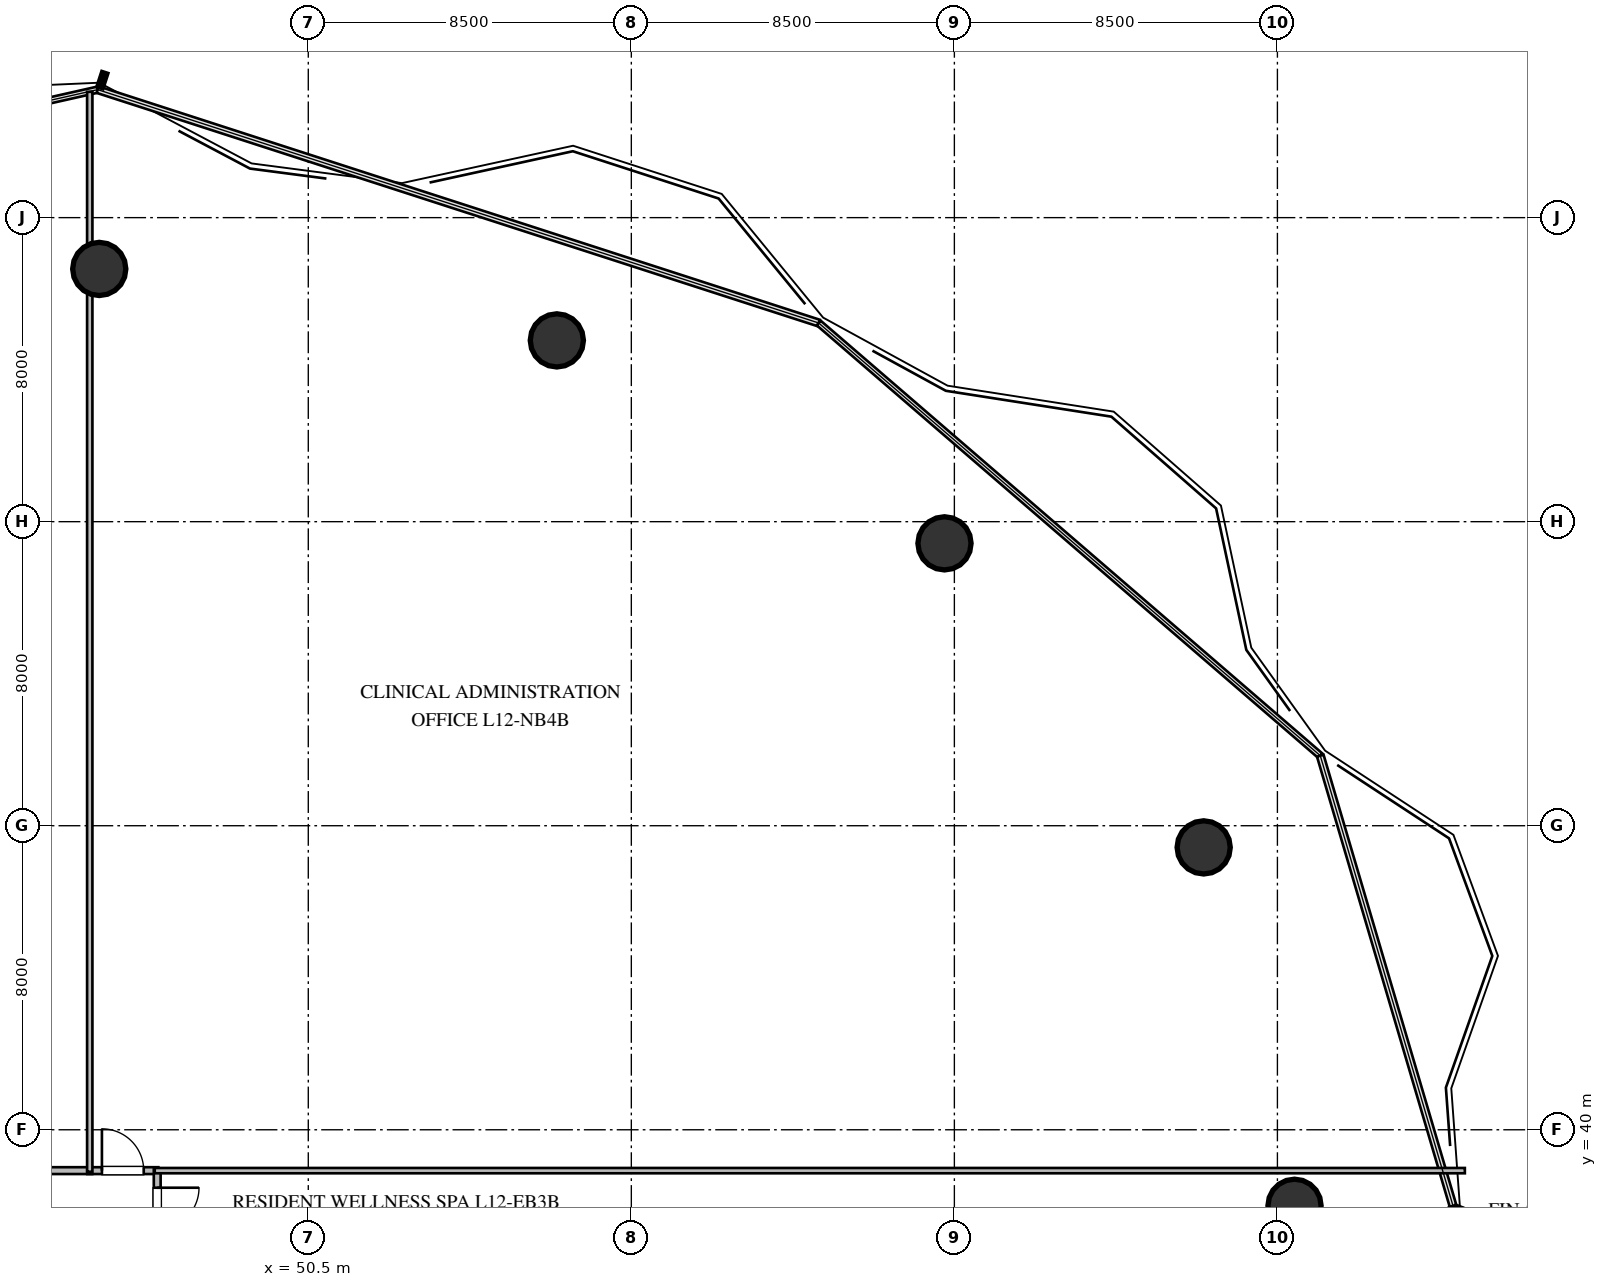
"""IFC4 building model, lengths in metres.
Left out: names, types, materials, properties, quantities, classifications, styles, units other than length and angle.
Written with IfcOpenShell. Run it as: python <this file> out.ifc"""

import sys

from ifc_helpers import new_model, si_unit, direction, frame, frame_2d, origin, origin_2d, place, context, subcontext, project, spatial, rectangle, circle, extrude, element, fill, save


model = new_model("IFC4")
c1 = context("Model", 3, precision=1e-05, world=origin(), true_north=direction((0.0, 1.0)))
c2 = subcontext(c1, "Body", "Model", "MODEL_VIEW")
j1 = project(units=[si_unit("LENGTHUNIT", "METRE"), si_unit("PLANEANGLEUNIT", "RADIAN")], contexts=[c1])
p1 = place(None, origin())
s1 = spatial("IfcSite", under=j1, at=p1, CompositionType="ELEMENT")
p2 = place(p1, origin())
s2 = spatial("IfcBuilding", under=s1, at=p2, CompositionType="ELEMENT")
p3 = place(p2, frame((0.0, 0.0, 49.2)))
s3 = spatial("IfcBuildingStorey", under=s2, at=p3, CompositionType="ELEMENT", Elevation=49.2)
for number, where, z_axis, x_axis in (
    (1, (76.45, 38.0, 0.0), (0.0, 0.0, 1.0), (1.0, 0.0, 0.0)),
    (2, (74.06, 47.43, 0.0), (0.0, 0.0, 1.0), (1.0, 0.0, 0.0)),
    (3, (67.24, 55.43, 0.0), (0.0, 0.0, 1.0), (1.0, 0.0, 0.0)),
    (4, (57.04, 60.77, 0.0), (0.0, 0.0, 1.0), (1.0, 0.0, 0.0)),
    (5, (45.0, 62.65, 0.0), (0.0, 0.0, 1.0), (1.0, 0.0, 0.0)),
):
    element("IfcColumn", number, at=place(p3, frame(where, z_axis=z_axis, x_axis=x_axis)), inside=s3, PredefinedType="COLUMN", context=c2, shape_type="SweptSolid", body=[
        extrude(circle(Radius=0.7, at=origin_2d()), origin(), (0.0, 0.0, 1.0), 3.6),
    ])
p4 = place(p3, frame((39.935, 38.925, 0.0), z_axis=(0.0, 0.0, 1.0), x_axis=(1.0, 0.0, 0.0)))
e6 = element("IfcWall", 6, at=p4, inside=s3, PredefinedType="PARTITIONING", context=c2, shape_type="SweptSolid", body=[
    extrude(rectangle(XDim=4.88, YDim=0.18, at=frame_2d((2.44, 0.0))), origin(), (0.0, 0.0, 1.0), 3.36),
])
p5 = place(p4, frame((1.89, 0.0, 0.0)))
e7 = element("IfcOpeningElement", 7, at=p5, cuts=e6, PredefinedType="OPENING", context=c2, shape_type="SweptSolid", body=[
    extrude(rectangle(XDim=1.1, YDim=2.1, at=frame_2d((0.55, 1.05))), frame((0.0, 0.1, 0.0), z_axis=(0.0, -1.0, 0.0), x_axis=(1.0, 0.0, 0.0)), (0.0, 0.0, 1.0), 0.2),
])
p6 = place(p3, frame((44.685, 38.925, 0.0), z_axis=(0.0, 0.0, 1.0), x_axis=(1.0, 0.0, 0.0)))
e8 = element("IfcWall", 8, at=p6, inside=s3, PredefinedType="PARTITIONING", context=c2, shape_type="SweptSolid", body=[
    extrude(rectangle(XDim=1.87, YDim=0.18, at=frame_2d((0.935, 0.0))), origin(), (0.0, 0.0, 1.0), 3.36),
])
p7 = place(p6, frame((0.385, 0.0, 0.0)))
e9 = element("IfcOpeningElement", 9, at=p7, cuts=e8, PredefinedType="OPENING", context=c2, shape_type="SweptSolid", body=[
    extrude(rectangle(XDim=1.1, YDim=2.1, at=frame_2d((0.55, 1.05))), frame((0.0, 0.1, 0.0), z_axis=(0.0, -1.0, 0.0), x_axis=(1.0, 0.0, 0.0)), (0.0, 0.0, 1.0), 0.2),
])
p8 = place(p3, frame((46.525, 38.955, 0.0), z_axis=(0.0, 0.0, 1.0), x_axis=(0.0, -1.0, 0.0)))
e10 = element("IfcWall", 10, at=p8, inside=s3, PredefinedType="PARTITIONING", context=c2, shape_type="SweptSolid", body=[
    extrude(rectangle(XDim=2.06, YDim=0.18, at=frame_2d((1.03, 0.0))), origin(), (0.0, 0.0, 1.0), 3.36),
])
p9 = place(p8, frame((0.48, 0.0, 0.0)))
e11 = element("IfcOpeningElement", 11, at=p9, cuts=e10, PredefinedType="OPENING", context=c2, shape_type="SweptSolid", body=[
    extrude(rectangle(XDim=1.1, YDim=2.1, at=frame_2d((0.55, 1.05))), frame((0.0, 0.1, 0.0), z_axis=(0.0, -1.0, 0.0), x_axis=(1.0, 0.0, 0.0)), (0.0, 0.0, 1.0), 0.2),
])
p10 = place(p3, frame((44.75, 67.311, 0.0), z_axis=(0.0, 0.0, 1.0), x_axis=(0.0, -1.0, 0.0)))
e12 = element("IfcWall", 12, at=p10, inside=s3, PredefinedType="PARTITIONING", context=c2, shape_type="SweptSolid", body=[
    extrude(rectangle(XDim=28.416, YDim=0.14, at=frame_2d((14.208, 0.0))), origin(), (0.0, 0.0, 1.0), 2.806),
])
p11 = place(p3, frame((80.932, 38.925, 0.0), z_axis=(0.0, 0.0, 1.0), x_axis=(-1.0, 0.0, 0.0)))
e13 = element("IfcWall", 13, at=p11, inside=s3, PredefinedType="PARTITIONING", context=c2, shape_type="SweptSolid", body=[
    extrude(rectangle(XDim=34.472, YDim=0.14, at=frame_2d((17.236, 0.0))), origin(), (0.0, 0.0, 1.0), 3.36),
])
p12 = place(p7, origin())
e14 = element("IfcDoor", 14, at=p12, inside=s3, OperationType="SINGLE_SWING_LEFT", PredefinedType="DOOR", context=c2, shape_type="SweptSolid", body=[
    extrude(rectangle(XDim=1.1, YDim=2.1, at=frame_2d((0.55, 1.05))), frame((0.0, 0.025, 0.0), z_axis=(0.0, -1.0, 0.0), x_axis=(1.0, 0.0, 0.0)), (0.0, 0.0, 1.0), 0.05),
])
fill(e9, e14)
p13 = place(p9, origin())
e15 = element("IfcDoor", 15, at=p13, inside=s3, OperationType="SINGLE_SWING_LEFT", PredefinedType="DOOR", context=c2, shape_type="SweptSolid", body=[
    extrude(rectangle(XDim=1.1, YDim=2.1, at=frame_2d((0.55, 1.05))), frame((0.0, 0.025, 0.0), z_axis=(0.0, -1.0, 0.0), x_axis=(1.0, 0.0, 0.0)), (0.0, 0.0, 1.0), 0.05),
])
fill(e11, e15)
save(model, sys.argv[1])
